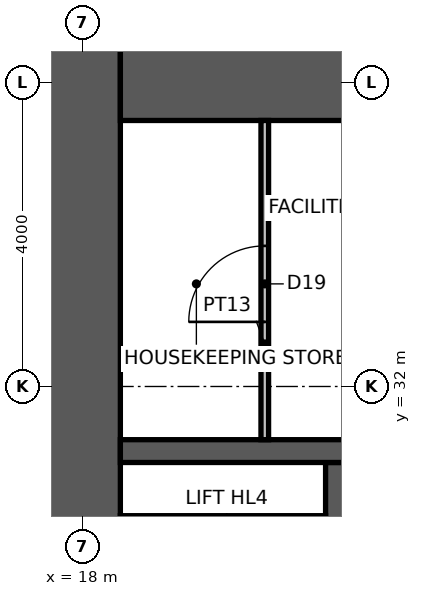
"""IFC4 building model, lengths in metres.
Left out: names, types, materials, properties, quantities, classifications, styles, units other than length and angle.
Written with IfcOpenShell. Run it as: python <this file> out.ifc"""

import sys

from ifc_helpers import new_model, si_unit, direction, frame, frame_2d, origin, place, context, subcontext, project, spatial, rectangle, extrude, element, fill, save


model = new_model("IFC4")
c1 = context("Model", 3, precision=1e-05, world=origin(), true_north=direction((0.0, 1.0)))
c2 = subcontext(c1, "Body", "Model", "MODEL_VIEW")
j1 = project(units=[si_unit("LENGTHUNIT", "METRE"), si_unit("PLANEANGLEUNIT", "RADIAN")], contexts=[c1])
p1 = place(None, origin())
s1 = spatial("IfcSite", under=j1, at=p1, CompositionType="ELEMENT")
p2 = place(p1, origin())
s2 = spatial("IfcBuilding", under=s1, at=p2, CompositionType="ELEMENT")
p3 = place(p2, frame((0.0, 0.0, 187.8)))
s3 = spatial("IfcBuildingStorey", under=s2, at=p3, CompositionType="ELEMENT", Elevation=187.8)
p4 = place(p3, frame((18.0, 17.5, -0.15), z_axis=(0.0, 0.0, 1.0), x_axis=(0.0, 1.0, 0.0)))
e1 = element("IfcWall", 1, at=p4, inside=s3, PredefinedType="SHEAR", context=c2, shape_type="SweptSolid", body=[
    extrude(rectangle(XDim=19.0, YDim=1.0, at=frame_2d((9.5, 0.0))), origin(), (0.0, 0.0, 1.0), 4.0),
])
p5 = place(p3, frame((18.5, 36.0, -0.15), z_axis=(0.0, 0.0, 1.0), x_axis=(1.0, 0.0, 0.0)))
e2 = element("IfcWall", 2, at=p5, inside=s3, PredefinedType="SHEAR", context=c2, shape_type="SweptSolid", body=[
    extrude(rectangle(XDim=17.6, YDim=1.0, at=frame_2d((8.8, 0.0))), origin(), (0.0, 0.0, 1.0), 4.0),
])
p6 = place(p3, frame((21.35, 18.5, -0.15), z_axis=(0.0, 0.0, 1.0), x_axis=(0.0, 1.0, 0.0)))
e3 = element("IfcWall", 3, at=p6, inside=s3, PredefinedType="SHEAR", context=c2, shape_type="SweptSolid", body=[
    extrude(rectangle(XDim=12.5, YDim=0.3, at=frame_2d((6.25, 0.0))), origin(), (0.0, 0.0, 1.0), 4.0),
])
p7 = place(p6, frame((0.875, 0.0, 0.15)))
e4 = element("IfcOpeningElement", 4, at=p7, cuts=e3, PredefinedType="OPENING", context=c2, shape_type="SweptSolid", body=[
    extrude(rectangle(XDim=1.1, YDim=2.2, at=frame_2d((0.55, 1.1))), frame((0.0, 0.16, 0.0), z_axis=(0.0, -1.0, 0.0), x_axis=(1.0, 0.0, 0.0)), (0.0, 0.0, 1.0), 0.32),
])
p8 = place(p6, frame((3.825, 0.0, 0.15)))
e5 = element("IfcOpeningElement", 5, at=p8, cuts=e3, PredefinedType="OPENING", context=c2, shape_type="SweptSolid", body=[
    extrude(rectangle(XDim=1.1, YDim=2.2, at=frame_2d((0.55, 1.1))), frame((0.0, 0.16, 0.0), z_axis=(0.0, -1.0, 0.0), x_axis=(1.0, 0.0, 0.0)), (0.0, 0.0, 1.0), 0.32),
])
p9 = place(p6, frame((6.675, 0.0, 0.15)))
e6 = element("IfcOpeningElement", 6, at=p9, cuts=e3, PredefinedType="OPENING", context=c2, shape_type="SweptSolid", body=[
    extrude(rectangle(XDim=1.1, YDim=2.2, at=frame_2d((0.55, 1.1))), frame((0.0, 0.16, 0.0), z_axis=(0.0, -1.0, 0.0), x_axis=(1.0, 0.0, 0.0)), (0.0, 0.0, 1.0), 0.32),
])
p10 = place(p6, frame((9.575, 0.0, 0.15)))
e7 = element("IfcOpeningElement", 7, at=p10, cuts=e3, PredefinedType="OPENING", context=c2, shape_type="SweptSolid", body=[
    extrude(rectangle(XDim=1.1, YDim=2.2, at=frame_2d((0.55, 1.1))), frame((0.0, 0.16, 0.0), z_axis=(0.0, -1.0, 0.0), x_axis=(1.0, 0.0, 0.0)), (0.0, 0.0, 1.0), 0.32),
])
p11 = place(p3, frame((18.5, 31.15, -0.15), z_axis=(0.0, 0.0, 1.0), x_axis=(1.0, 0.0, 0.0)))
e8 = element("IfcWall", 8, at=p11, inside=s3, PredefinedType="SHEAR", context=c2, shape_type="SweptSolid", body=[
    extrude(rectangle(XDim=5.35, YDim=0.3, at=frame_2d((2.675, 0.0))), origin(), (0.0, 0.0, 1.0), 4.0),
])
p12 = place(p11, frame((3.4, 0.0, 0.15)))
e9 = element("IfcOpeningElement", 9, at=p12, cuts=e8, PredefinedType="OPENING", context=c2, shape_type="SweptSolid", body=[
    extrude(rectangle(XDim=1.0, YDim=2.2, at=frame_2d((0.5, 1.1))), frame((0.0, 0.16, 0.0), z_axis=(0.0, -1.0, 0.0), x_axis=(1.0, 0.0, 0.0)), (0.0, 0.0, 1.0), 0.32),
])
p13 = place(p3, frame((20.4, 31.3, 0.0), z_axis=(0.0, 0.0, 1.0), x_axis=(0.0, 1.0, 0.0)))
e10 = element("IfcWall", 10, at=p13, inside=s3, PredefinedType="PARTITIONING", context=c2, shape_type="SweptSolid", body=[
    extrude(rectangle(XDim=4.2, YDim=0.1, at=frame_2d((2.1, 0.0))), origin(), (0.0, 0.0, 1.0), 3.85),
])
p14 = place(p13, frame((1.55, 0.0, 0.0)))
e11 = element("IfcOpeningElement", 11, at=p14, cuts=e10, PredefinedType="OPENING", context=c2, shape_type="SweptSolid", body=[
    extrude(rectangle(XDim=1.0, YDim=2.2, at=frame_2d((0.5, 1.1))), frame((0.0, 0.06, 0.0), z_axis=(0.0, -1.0, 0.0), x_axis=(1.0, 0.0, 0.0)), (0.0, 0.0, 1.0), 0.12),
])
p15 = place(p14, origin())
e12 = element("IfcDoor", 12, at=p15, inside=s3, OperationType="SINGLE_SWING_LEFT", PredefinedType="DOOR", context=c2, shape_type="SweptSolid", body=[
    extrude(rectangle(XDim=1.0, YDim=2.2, at=frame_2d((0.5, 1.1))), frame((0.0, 0.025, 0.0), z_axis=(0.0, -1.0, 0.0), x_axis=(1.0, 0.0, 0.0)), (0.0, 0.0, 1.0), 0.05),
])
fill(e11, e12)
save(model, sys.argv[1])
